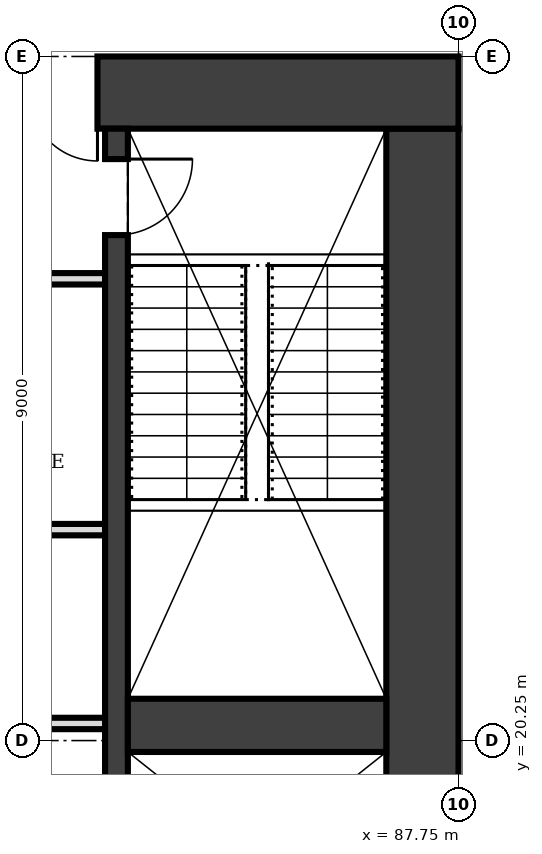
"""IFC4 building model, lengths in metres.
Left out: names, types, materials, properties, quantities, classifications, styles, units other than length and angle.
Written with IfcOpenShell. Run it as: python <this file> out.ifc"""

import sys

from ifc_helpers import new_model, si_unit, direction, frame, frame_2d, origin, place, context, subcontext, project, spatial, rectangle, extrude, element, fill, save


model = new_model("IFC4")
c1 = context("Model", 3, precision=1e-05, world=origin(), true_north=direction((0.0, 1.0)))
c2 = subcontext(c1, "Body", "Model", "MODEL_VIEW")
j1 = project(units=[si_unit("LENGTHUNIT", "METRE"), si_unit("PLANEANGLEUNIT", "RADIAN")], contexts=[c1])
p1 = place(None, origin())
s1 = spatial("IfcSite", under=j1, at=p1, CompositionType="ELEMENT")
p2 = place(p1, origin())
s2 = spatial("IfcBuilding", under=s1, at=p2, CompositionType="ELEMENT")
p3 = place(p2, frame((0.0, 0.0, 97.0)))
s3 = spatial("IfcBuildingStorey", under=s2, at=p3, CompositionType="ELEMENT", Elevation=97.0)
p4 = place(p3, frame((87.275, 12.2, 0.0), z_axis=(0.0, 0.0, 1.0), x_axis=(0.0, 1.0, 0.0)))
e1 = element("IfcWall", 1, at=p4, inside=s3, PredefinedType="SHEAR", context=c2, shape_type="SweptSolid", body=[
    extrude(rectangle(XDim=16.1, YDim=0.95, at=frame_2d((8.05, 0.0))), origin(), (0.0, 0.0, 1.0), 4.0),
])
p5 = place(p3, frame((87.75, 28.775, 0.0), z_axis=(0.0, 0.0, 1.0), x_axis=(-1.0, 0.0, 0.0)))
e2 = element("IfcWall", 2, at=p5, inside=s3, PredefinedType="SHEAR", context=c2, shape_type="SweptSolid", body=[
    extrude(rectangle(XDim=13.5, YDim=0.95, at=frame_2d((6.75, 0.0))), origin(), (0.0, 0.0, 1.0), 4.0),
])
p6 = place(p5, frame((4.75, 0.0, 0.0)))
e3 = element("IfcOpeningElement", 3, at=p6, cuts=e2, PredefinedType="OPENING", context=c2, shape_type="SweptSolid", body=[
    extrude(rectangle(XDim=1.8, YDim=2.1, at=frame_2d((0.9, 1.05))), frame((0.0, 0.485, 0.0), z_axis=(0.0, -1.0, 0.0), x_axis=(1.0, 0.0, 0.0)), (0.0, 0.0, 1.0), 0.97),
])
p7 = place(p3, frame((83.25, 12.2, 0.0), z_axis=(0.0, 0.0, 1.0), x_axis=(0.0, 1.0, 0.0)))
e4 = element("IfcWall", 4, at=p7, inside=s3, PredefinedType="SHEAR", context=c2, shape_type="SweptSolid", body=[
    extrude(rectangle(XDim=16.1, YDim=0.3, at=frame_2d((8.05, 0.0))), origin(), (0.0, 0.0, 1.0), 4.0),
])
p8 = place(p7, frame((14.7, 0.0, 0.0)))
e5 = element("IfcOpeningElement", 5, at=p8, cuts=e4, PredefinedType="OPENING", context=c2, shape_type="SweptSolid", body=[
    extrude(rectangle(XDim=1.0, YDim=2.1, at=frame_2d((0.5, 1.05))), frame((0.0, 0.16, 0.0), z_axis=(0.0, -1.0, 0.0), x_axis=(1.0, 0.0, 0.0)), (0.0, 0.0, 1.0), 0.32),
])
p9 = place(p7, frame((0.4, 0.0, 0.0)))
e6 = element("IfcOpeningElement", 6, at=p9, cuts=e4, PredefinedType="OPENING", context=c2, shape_type="SweptSolid", body=[
    extrude(rectangle(XDim=1.1, YDim=2.1, at=frame_2d((0.55, 1.05))), frame((0.0, 0.16, 0.0), z_axis=(0.0, -1.0, 0.0), x_axis=(1.0, 0.0, 0.0)), (0.0, 0.0, 1.0), 0.32),
])
p10 = place(p7, frame((6.0, 0.0, 0.0)))
e7 = element("IfcOpeningElement", 7, at=p10, cuts=e4, PredefinedType="OPENING", context=c2, shape_type="SweptSolid", body=[
    extrude(rectangle(XDim=1.1, YDim=2.1, at=frame_2d((0.55, 1.05))), frame((0.0, 0.16, 0.0), z_axis=(0.0, -1.0, 0.0), x_axis=(1.0, 0.0, 0.0)), (0.0, 0.0, 1.0), 0.32),
])
p11 = place(p3, frame((83.4, 20.45, 0.0), z_axis=(0.0, 0.0, 1.0), x_axis=(1.0, 0.0, 0.0)))
e8 = element("IfcWall", 8, at=p11, inside=s3, PredefinedType="SHEAR", context=c2, shape_type="SweptSolid", body=[
    extrude(rectangle(XDim=3.4, YDim=0.7, at=frame_2d((1.7, 0.0))), origin(), (0.0, 0.0, 1.0), 4.0),
])
for number, where, z_axis, x_axis in (
    (9, (81.3, 20.475, 0.0), (0.0, 0.0, 1.0), (1.0, 0.0, 0.0)),
    (10, (81.3, 23.025, 0.0), (0.0, 0.0, 1.0), (1.0, 0.0, 0.0)),
    (11, (81.3, 26.325, 0.0), (0.0, 0.0, 1.0), (1.0, 0.0, 0.0)),
):
    element("IfcWall", number, at=place(p3, frame(where, z_axis=z_axis, x_axis=x_axis)), inside=s3, PredefinedType="PARTITIONING", context=c2, shape_type="SweptSolid", body=[
        extrude(rectangle(XDim=1.8, YDim=0.15, at=frame_2d((0.9, 0.0))), origin(), (0.0, 0.0, 1.0), 3.75),
    ])
p12 = place(p6, origin())
e12 = element("IfcDoor", 12, at=p12, inside=s3, OperationType="DOUBLE_DOOR_SINGLE_SWING", PredefinedType="DOOR", context=c2, shape_type="SweptSolid", body=[
    extrude(rectangle(XDim=1.8, YDim=2.1, at=frame_2d((0.9, 1.05))), frame((0.0, 0.025, 0.0), z_axis=(0.0, -1.0, 0.0), x_axis=(1.0, 0.0, 0.0)), (0.0, 0.0, 1.0), 0.05),
])
fill(e3, e12)
p13 = place(p8, frame((1.0, 0.0, 0.0), z_axis=(0.0, 0.0, 1.0), x_axis=(-1.0, 0.0, 0.0)))
e13 = element("IfcDoor", 13, at=p13, inside=s3, OperationType="SINGLE_SWING_LEFT", PredefinedType="DOOR", context=c2, shape_type="SweptSolid", body=[
    extrude(rectangle(XDim=1.0, YDim=2.1, at=frame_2d((0.5, 1.05))), frame((0.0, 0.025, 0.0), z_axis=(0.0, -1.0, 0.0), x_axis=(1.0, 0.0, 0.0)), (0.0, 0.0, 1.0), 0.05),
])
fill(e5, e13)
save(model, sys.argv[1])
